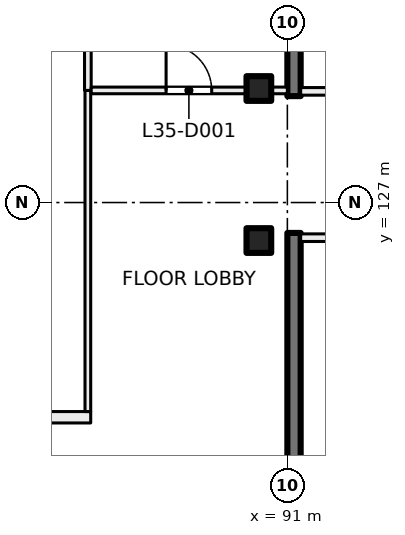
"""IFC4 building model, lengths in metres.
Left out: names, types, materials, properties, quantities, classifications, styles, units other than length and angle.
Written with IfcOpenShell. Run it as: python <this file> out.ifc"""

import sys

from ifc_helpers import new_model, si_unit, direction, frame, frame_2d, origin, origin_2d, place, context, subcontext, project, spatial, rectangle, extrude, element, fill, save


model = new_model("IFC4")
c1 = context("Model", 3, precision=1e-05, world=origin(), true_north=direction((0.0, 1.0)))
c2 = subcontext(c1, "Body", "Model", "MODEL_VIEW")
j1 = project(units=[si_unit("LENGTHUNIT", "METRE"), si_unit("PLANEANGLEUNIT", "RADIAN")], contexts=[c1])
p1 = place(None, origin())
s1 = spatial("IfcSite", under=j1, at=p1, CompositionType="ELEMENT")
p2 = place(p1, origin())
s2 = spatial("IfcBuilding", under=s1, at=p2, CompositionType="ELEMENT")
p3 = place(p2, frame((0.0, 0.0, 150.5)))
s3 = spatial("IfcBuildingStorey", under=s2, at=p3, CompositionType="ELEMENT", Elevation=150.5)
for number, where, z_axis, x_axis in (
    (1, (90.25, 130.0, 0.0), (0.0, 0.0, 1.0), (1.0, 0.0, 0.0)),
    (2, (90.25, 126.0, 0.0), (0.0, 0.0, 1.0), (1.0, 0.0, 0.0)),
):
    element("IfcColumn", number, at=place(p3, frame(where, z_axis=z_axis, x_axis=x_axis)), inside=s3, PredefinedType="COLUMN", context=c2, shape_type="SweptSolid", body=[
        extrude(rectangle(XDim=0.65, YDim=0.65, at=origin_2d()), origin(), (0.0, 0.0, 1.0), 4.0),
    ])
for number, where, z_axis, x_axis in (
    (3, (91.175, 138.45, 0.0), (0.0, 0.0, 1.0), (0.0, -1.0, 0.0)),
    (4, (91.175, 126.2, 0.0), (0.0, 0.0, 1.0), (0.0, -1.0, 0.0)),
):
    element("IfcWall", number, at=place(p3, frame(where, z_axis=z_axis, x_axis=x_axis)), inside=s3, PredefinedType="SHEAR", context=c2, shape_type="SweptSolid", body=[
        extrude(rectangle(XDim=8.65, YDim=0.35, at=frame_2d((4.325, 0.0))), origin(), (0.0, 0.0, 1.0), 4.0),
    ])
p4 = place(p3, frame((95.225, 126.075, 0.0), z_axis=(0.0, 0.0, 1.0), x_axis=(-1.0, 0.0, 0.0)))
e5 = element("IfcWall", 5, at=p4, inside=s3, PredefinedType="PARTITIONING", context=c2, shape_type="SweptSolid", body=[
    extrude(rectangle(XDim=3.875, YDim=0.2, at=frame_2d((1.938, 0.0))), origin(), (0.0, 0.0, 1.0), 3.625),
])
p5 = place(p4, frame((0.3, 0.0, 0.0)))
e6 = element("IfcOpeningElement", 6, at=p5, cuts=e5, PredefinedType="OPENING", context=c2, shape_type="SweptSolid", body=[
    extrude(rectangle(XDim=1.2, YDim=2.1, at=frame_2d((0.6, 1.05))), frame((0.0, 0.11, 0.0), z_axis=(0.0, -1.0, 0.0), x_axis=(1.0, 0.0, 0.0)), (0.0, 0.0, 1.0), 0.22),
])
p6 = place(p3, frame((91.35, 129.925, 0.0), z_axis=(0.0, 0.0, 1.0), x_axis=(1.0, 0.0, 0.0)))
e7 = element("IfcWall", 7, at=p6, inside=s3, PredefinedType="PARTITIONING", context=c2, shape_type="SweptSolid", body=[
    extrude(rectangle(XDim=3.875, YDim=0.2, at=frame_2d((1.938, 0.0))), origin(), (0.0, 0.0, 1.0), 3.625),
])
p7 = place(p6, frame((2.375, 0.0, 0.0)))
e8 = element("IfcOpeningElement", 8, at=p7, cuts=e7, PredefinedType="OPENING", context=c2, shape_type="SweptSolid", body=[
    extrude(rectangle(XDim=1.2, YDim=2.1, at=frame_2d((0.6, 1.05))), frame((0.0, 0.11, 0.0), z_axis=(0.0, -1.0, 0.0), x_axis=(1.0, 0.0, 0.0)), (0.0, 0.0, 1.0), 0.22),
])
p8 = place(p3, frame((50.506, 121.35, 0.0), z_axis=(0.0, 0.0, 1.0), x_axis=(1.0, 0.0, 0.0)))
e9 = element("IfcWall", 9, at=p8, inside=s3, PredefinedType="PARTITIONING", context=c2, shape_type="SweptSolid", body=[
    extrude(rectangle(XDim=35.319, YDim=0.3, at=frame_2d((17.659, 0.0))), origin(), (0.0, 0.0, 1.0), 3.625),
])
p9 = place(p8, frame((13.844, 0.0, 0.0)))
e10 = element("IfcOpeningElement", 10, at=p9, cuts=e9, PredefinedType="OPENING", context=c2, shape_type="SweptSolid", body=[
    extrude(rectangle(XDim=0.8, YDim=2.1, at=frame_2d((0.4, 1.05))), frame((0.0, 0.16, 0.0), z_axis=(0.0, -1.0, 0.0), x_axis=(1.0, 0.0, 0.0)), (0.0, 0.0, 1.0), 0.32),
])
p10 = place(p8, frame((9.144, 0.0, 0.0)))
e11 = element("IfcOpeningElement", 11, at=p10, cuts=e9, PredefinedType="OPENING", context=c2, shape_type="SweptSolid", body=[
    extrude(rectangle(XDim=1.2, YDim=2.1, at=frame_2d((0.6, 1.05))), frame((0.0, 0.16, 0.0), z_axis=(0.0, -1.0, 0.0), x_axis=(1.0, 0.0, 0.0)), (0.0, 0.0, 1.0), 0.32),
])
p11 = place(p8, frame((24.594, 0.0, 0.0)))
e12 = element("IfcOpeningElement", 12, at=p11, cuts=e9, PredefinedType="OPENING", context=c2, shape_type="SweptSolid", body=[
    extrude(rectangle(XDim=1.8, YDim=2.1, at=frame_2d((0.9, 1.05))), frame((0.0, 0.16, 0.0), z_axis=(0.0, -1.0, 0.0), x_axis=(1.0, 0.0, 0.0)), (0.0, 0.0, 1.0), 0.32),
])
p12 = place(p8, frame((2.543, 0.0, 0.0)))
e13 = element("IfcOpeningElement", 13, at=p12, cuts=e9, PredefinedType="OPENING", context=c2, shape_type="SweptSolid", body=[
    extrude(rectangle(XDim=1.8, YDim=2.1, at=frame_2d((0.9, 1.05))), frame((0.0, 0.16, 0.0), z_axis=(0.0, -1.0, 0.0), x_axis=(1.0, 0.0, 0.0)), (0.0, 0.0, 1.0), 0.32),
])
p13 = place(p3, frame((85.75, 121.5, 0.0), z_axis=(0.0, 0.0, 1.0), x_axis=(0.0, 1.0, 0.0)))
e14 = element("IfcWall", 14, at=p13, inside=s3, PredefinedType="PARTITIONING", context=c2, shape_type="SweptSolid", body=[
    extrude(rectangle(XDim=8.45, YDim=0.15, at=frame_2d((4.225, 0.0))), origin(), (0.0, 0.0, 1.0), 3.625),
])
p14 = place(p3, frame((85.75, 129.95, 0.0), z_axis=(0.0, 0.0, 1.0), x_axis=(0.0, 1.0, 0.0)))
e15 = element("IfcWall", 15, at=p14, inside=s3, PredefinedType="PARTITIONING", context=c2, shape_type="SweptSolid", body=[
    extrude(rectangle(XDim=8.45, YDim=0.175, at=frame_2d((4.225, 0.0))), origin(), (0.0, 0.0, 1.0), 3.625),
])
p15 = place(p3, frame((85.838, 129.95, 0.0), z_axis=(0.0, 0.0, 1.0), x_axis=(1.0, 0.0, 0.0)))
e16 = element("IfcWall", 16, at=p15, inside=s3, PredefinedType="PARTITIONING", context=c2, shape_type="SweptSolid", body=[
    extrude(rectangle(XDim=5.162, YDim=0.175, at=frame_2d((2.581, 0.0))), origin(), (0.0, 0.0, 1.0), 3.625),
])
p16 = place(p15, frame((1.971, 0.0, 0.0)))
e17 = element("IfcOpeningElement", 17, at=p16, cuts=e16, PredefinedType="OPENING", context=c2, shape_type="SweptSolid", body=[
    extrude(rectangle(XDim=1.2, YDim=2.1, at=frame_2d((0.6, 1.05))), frame((0.0, 0.097, 0.0), z_axis=(0.0, -1.0, 0.0), x_axis=(1.0, 0.0, 0.0)), (0.0, 0.0, 1.0), 0.195),
])
p17 = place(p16, origin())
e18 = element("IfcDoor", 18, at=p17, inside=s3, OperationType="DOUBLE_DOOR_SINGLE_SWING", PredefinedType="DOOR", context=c2, shape_type="SweptSolid", body=[
    extrude(rectangle(XDim=1.2, YDim=2.1, at=frame_2d((0.6, 1.05))), frame((0.0, 0.025, 0.0), z_axis=(0.0, -1.0, 0.0), x_axis=(1.0, 0.0, 0.0)), (0.0, 0.0, 1.0), 0.05),
])
fill(e17, e18)
save(model, sys.argv[1])
